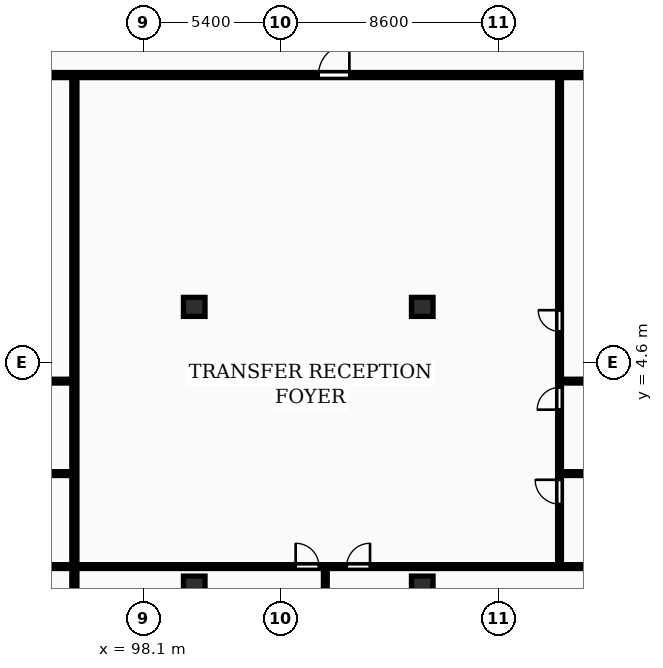
"""IFC4 building model, lengths in metres.
Left out: names, types, materials, properties, quantities, classifications, styles, units other than length and angle.
Written with IfcOpenShell. Run it as: python <this file> out.ifc"""

import sys

from ifc_helpers import new_model, si_unit, direction, frame, frame_2d, origin, origin_2d, place, context, subcontext, project, spatial, rectangle, extrude, element, fill, save


model = new_model("IFC4")
c1 = context("Model", 3, precision=1e-05, world=origin(), true_north=direction((0.0, 1.0)))
c2 = subcontext(c1, "Body", "Model", "MODEL_VIEW")
j1 = project(units=[si_unit("LENGTHUNIT", "METRE"), si_unit("PLANEANGLEUNIT", "RADIAN")], contexts=[c1])
p1 = place(None, origin())
s1 = spatial("IfcSite", under=j1, at=p1, CompositionType="ELEMENT")
p2 = place(p1, origin())
s2 = spatial("IfcBuilding", under=s1, at=p2, CompositionType="ELEMENT")
p3 = place(p2, frame((0.0, 0.0, 93.8)))
s3 = spatial("IfcBuildingStorey", under=s2, at=p3, CompositionType="ELEMENT", Elevation=93.8)
for number, where, z_axis, x_axis in (
    (1, (100.1, -4.2, 0.0), (0.0, 0.0, 1.0), (1.0, 0.0, 0.0)),
    (2, (100.1, 6.8, 0.0), (0.0, 0.0, 1.0), (1.0, 0.0, 0.0)),
    (3, (109.1, -4.2, 0.0), (0.0, 0.0, 1.0), (1.0, 0.0, 0.0)),
    (4, (109.1, 6.8, 0.0), (0.0, 0.0, 1.0), (1.0, 0.0, 0.0)),
):
    element("IfcColumn", number, at=place(p3, frame(where, z_axis=z_axis, x_axis=x_axis)), inside=s3, PredefinedType="COLUMN", context=c2, shape_type="SweptSolid", body=[
        extrude(rectangle(XDim=0.85, YDim=0.75, at=origin_2d()), origin(), (0.0, 0.0, 1.0), 3.25),
    ])
p4 = place(p3, frame((95.369, -8.7, 0.0), z_axis=(0.0, 0.0, 1.0), x_axis=(0.0, 1.0, 0.0)))
e5 = element("IfcWall", 5, at=p4, inside=s3, PredefinedType="PARTITIONING", context=c2, shape_type="SweptSolid", body=[
    extrude(rectangle(XDim=24.57, YDim=0.2, at=frame_2d((12.285, 0.0))), origin(), (0.0, 0.0, 1.0), 2.97),
])
for number, where, z_axis, x_axis in (
    (6, (91.929, 0.22, 0.0), (0.0, 0.0, 1.0), (1.0, 0.0, 0.0)),
    (7, (91.929, 3.87, 0.0), (0.0, 0.0, 1.0), (1.0, 0.0, 0.0)),
):
    element("IfcWall", number, at=place(p3, frame(where, z_axis=z_axis, x_axis=x_axis)), inside=s3, PredefinedType="PARTITIONING", context=c2, shape_type="SweptSolid", body=[
        extrude(rectangle(XDim=3.36, YDim=0.15, at=frame_2d((1.68, 0.0))), origin(), (0.0, 0.0, 1.0), 2.97),
    ])
p5 = place(p3, frame((72.78, -3.45, 0.0), z_axis=(0.0, 0.0, 1.0), x_axis=(1.0, 0.0, 0.0)))
e8 = element("IfcWall", 8, at=p5, inside=s3, PredefinedType="PARTITIONING", context=c2, shape_type="SweptSolid", body=[
    extrude(rectangle(XDim=22.509, YDim=0.15, at=frame_2d((11.254, 0.0))), origin(), (0.0, 0.0, 1.0), 2.97),
])
p6 = place(p5, frame((6.645, 0.0, 0.0)))
e9 = element("IfcOpeningElement", 9, at=p6, cuts=e8, PredefinedType="OPENING", context=c2, shape_type="SweptSolid", body=[
    extrude(rectangle(XDim=0.92, YDim=2.08, at=frame_2d((0.46, 1.04))), frame((0.0, 0.085, 0.0), z_axis=(0.0, -1.0, 0.0), x_axis=(1.0, 0.0, 0.0)), (0.0, 0.0, 1.0), 0.17),
])
p7 = place(p5, frame((11.024, 0.0, 0.0)))
e10 = element("IfcOpeningElement", 10, at=p7, cuts=e8, PredefinedType="OPENING", context=c2, shape_type="SweptSolid", body=[
    extrude(rectangle(XDim=0.92, YDim=2.08, at=frame_2d((0.46, 1.04))), frame((0.0, 0.085, 0.0), z_axis=(0.0, -1.0, 0.0), x_axis=(1.0, 0.0, 0.0)), (0.0, 0.0, 1.0), 0.17),
])
for number, where, z_axis, x_axis in (
    (11, (114.579, 0.22, 0.0), (0.0, 0.0, 1.0), (1.0, 0.0, 0.0)),
    (12, (114.579, 3.87, 0.0), (0.0, 0.0, 1.0), (1.0, 0.0, 0.0)),
):
    element("IfcWall", number, at=place(p3, frame(where, z_axis=z_axis, x_axis=x_axis)), inside=s3, PredefinedType="PARTITIONING", context=c2, shape_type="SweptSolid", body=[
        extrude(rectangle(XDim=3.13, YDim=0.15, at=frame_2d((1.565, 0.0))), origin(), (0.0, 0.0, 1.0), 2.97),
    ])
p8 = place(p3, frame((114.519, -3.39, 0.0), z_axis=(0.0, 0.0, 1.0), x_axis=(0.0, 1.0, 0.0)))
e13 = element("IfcWall", 13, at=p8, inside=s3, PredefinedType="PARTITIONING", context=c2, shape_type="SweptSolid", body=[
    extrude(rectangle(XDim=19.28, YDim=0.15, at=frame_2d((9.64, 0.0))), origin(), (0.0, 0.0, 1.0), 2.97),
])
p9 = place(p8, frame((2.406, 0.0, 0.0)))
e14 = element("IfcOpeningElement", 14, at=p9, cuts=e13, PredefinedType="OPENING", context=c2, shape_type="SweptSolid", body=[
    extrude(rectangle(XDim=0.96, YDim=2.1, at=frame_2d((0.48, 1.05))), frame((0.0, 0.085, 0.0), z_axis=(0.0, -1.0, 0.0), x_axis=(1.0, 0.0, 0.0)), (0.0, 0.0, 1.0), 0.17),
])
p10 = place(p8, frame((6.133, 0.0, 0.0)))
e15 = element("IfcOpeningElement", 15, at=p10, cuts=e13, PredefinedType="OPENING", context=c2, shape_type="SweptSolid", body=[
    extrude(rectangle(XDim=0.88, YDim=2.06, at=frame_2d((0.44, 1.03))), frame((0.0, 0.085, 0.0), z_axis=(0.0, -1.0, 0.0), x_axis=(1.0, 0.0, 0.0)), (0.0, 0.0, 1.0), 0.17),
])
p11 = place(p8, frame((9.22, 0.0, 0.0)))
e16 = element("IfcOpeningElement", 16, at=p11, cuts=e13, PredefinedType="OPENING", context=c2, shape_type="SweptSolid", body=[
    extrude(rectangle(XDim=0.84, YDim=2.04, at=frame_2d((0.42, 1.02))), frame((0.0, 0.085, 0.0), z_axis=(0.0, -1.0, 0.0), x_axis=(1.0, 0.0, 0.0)), (0.0, 0.0, 1.0), 0.17),
])
p12 = place(p3, frame((105.274, -8.7, 0.0), z_axis=(0.0, 0.0, 1.0), x_axis=(0.0, 1.0, 0.0)))
e17 = element("IfcWall", 17, at=p12, inside=s3, PredefinedType="PARTITIONING", context=c2, shape_type="SweptSolid", body=[
    extrude(rectangle(XDim=5.17, YDim=0.15, at=frame_2d((2.585, 0.0))), origin(), (0.0, 0.0, 1.0), 2.97),
])
p13 = place(p3, frame((95.449, -3.45, 0.0), z_axis=(0.0, 0.0, 1.0), x_axis=(1.0, 0.0, 0.0)))
e18 = element("IfcWall", 18, at=p13, inside=s3, PredefinedType="PARTITIONING", context=c2, shape_type="SweptSolid", body=[
    extrude(rectangle(XDim=22.26, YDim=0.15, at=frame_2d((11.13, 0.0))), origin(), (0.0, 0.0, 1.0), 2.97),
])
p14 = place(p13, frame((8.655, 0.0, 0.0)))
e19 = element("IfcOpeningElement", 19, at=p14, cuts=e18, PredefinedType="OPENING", context=c2, shape_type="SweptSolid", body=[
    extrude(rectangle(XDim=0.92, YDim=2.08, at=frame_2d((0.46, 1.04))), frame((0.0, 0.085, 0.0), z_axis=(0.0, -1.0, 0.0), x_axis=(1.0, 0.0, 0.0)), (0.0, 0.0, 1.0), 0.17),
])
p15 = place(p13, frame((10.67, 0.0, 0.0)))
e20 = element("IfcOpeningElement", 20, at=p15, cuts=e18, PredefinedType="OPENING", context=c2, shape_type="SweptSolid", body=[
    extrude(rectangle(XDim=0.92, YDim=2.08, at=frame_2d((0.46, 1.04))), frame((0.0, 0.085, 0.0), z_axis=(0.0, -1.0, 0.0), x_axis=(1.0, 0.0, 0.0)), (0.0, 0.0, 1.0), 0.17),
])
p16 = place(p3, frame((72.7, 15.95, 0.0), z_axis=(0.0, 0.0, 1.0), x_axis=(1.0, 0.0, 0.0)))
e21 = element("IfcWall", 21, at=p16, inside=s3, PredefinedType="PARTITIONING", context=c2, shape_type="SweptSolid", body=[
    extrude(rectangle(XDim=58.0, YDim=0.2, at=frame_2d((29.0, 0.0))), origin(), (0.0, 0.0, 1.0), 2.97),
])
p17 = place(p16, frame((11.114, 0.0, 0.0)))
e22 = element("IfcOpeningElement", 22, at=p17, cuts=e21, PredefinedType="OPENING", context=c2, shape_type="SweptSolid", body=[
    extrude(rectangle(XDim=1.22, YDim=2.18, at=frame_2d((0.61, 1.09))), frame((0.0, 0.11, 0.0), z_axis=(0.0, -1.0, 0.0), x_axis=(1.0, 0.0, 0.0)), (0.0, 0.0, 1.0), 0.22),
])
p18 = place(p16, frame((32.304, 0.0, 0.0)))
e23 = element("IfcOpeningElement", 23, at=p18, cuts=e21, PredefinedType="OPENING", context=c2, shape_type="SweptSolid", body=[
    extrude(rectangle(XDim=1.22, YDim=2.18, at=frame_2d((0.61, 1.09))), frame((0.0, 0.11, 0.0), z_axis=(0.0, -1.0, 0.0), x_axis=(1.0, 0.0, 0.0)), (0.0, 0.0, 1.0), 0.22),
])
p19 = place(p16, frame((47.134, 0.0, 0.0)))
e24 = element("IfcOpeningElement", 24, at=p19, cuts=e21, PredefinedType="OPENING", context=c2, shape_type="SweptSolid", body=[
    extrude(rectangle(XDim=0.95, YDim=2.15, at=frame_2d((0.475, 1.075))), frame((0.0, 0.11, 0.0), z_axis=(0.0, -1.0, 0.0), x_axis=(1.0, 0.0, 0.0)), (0.0, 0.0, 1.0), 0.22),
])
p20 = place(p9, origin())
e25 = element("IfcDoor", 25, at=p20, inside=s3, OperationType="SINGLE_SWING_RIGHT", PredefinedType="DOOR", context=c2, shape_type="SweptSolid", body=[
    extrude(rectangle(XDim=0.96, YDim=2.1, at=frame_2d((0.48, 1.05))), frame((0.0, 0.025, 0.0), z_axis=(0.0, -1.0, 0.0), x_axis=(1.0, 0.0, 0.0)), (0.0, 0.0, 1.0), 0.05),
])
fill(e14, e25)
p21 = place(p10, origin())
e26 = element("IfcDoor", 26, at=p21, inside=s3, OperationType="SINGLE_SWING_LEFT", PredefinedType="DOOR", context=c2, shape_type="SweptSolid", body=[
    extrude(rectangle(XDim=0.88, YDim=2.06, at=frame_2d((0.44, 1.03))), frame((0.0, 0.025, 0.0), z_axis=(0.0, -1.0, 0.0), x_axis=(1.0, 0.0, 0.0)), (0.0, 0.0, 1.0), 0.05),
])
fill(e15, e26)
p22 = place(p11, origin())
e27 = element("IfcDoor", 27, at=p22, inside=s3, OperationType="SINGLE_SWING_RIGHT", PredefinedType="DOOR", context=c2, shape_type="SweptSolid", body=[
    extrude(rectangle(XDim=0.84, YDim=2.04, at=frame_2d((0.42, 1.02))), frame((0.0, 0.025, 0.0), z_axis=(0.0, -1.0, 0.0), x_axis=(1.0, 0.0, 0.0)), (0.0, 0.0, 1.0), 0.05),
])
fill(e16, e27)
p23 = place(p14, origin())
e28 = element("IfcDoor", 28, at=p23, inside=s3, OperationType="SINGLE_SWING_LEFT", PredefinedType="DOOR", context=c2, shape_type="SweptSolid", body=[
    extrude(rectangle(XDim=0.92, YDim=2.08, at=frame_2d((0.46, 1.04))), frame((0.0, 0.025, 0.0), z_axis=(0.0, -1.0, 0.0), x_axis=(1.0, 0.0, 0.0)), (0.0, 0.0, 1.0), 0.05),
])
fill(e19, e28)
p24 = place(p15, origin())
e29 = element("IfcDoor", 29, at=p24, inside=s3, OperationType="SINGLE_SWING_RIGHT", PredefinedType="DOOR", context=c2, shape_type="SweptSolid", body=[
    extrude(rectangle(XDim=0.92, YDim=2.08, at=frame_2d((0.46, 1.04))), frame((0.0, 0.025, 0.0), z_axis=(0.0, -1.0, 0.0), x_axis=(1.0, 0.0, 0.0)), (0.0, 0.0, 1.0), 0.05),
])
fill(e20, e29)
p25 = place(p18, origin())
e30 = element("IfcDoor", 30, at=p25, inside=s3, OperationType="SINGLE_SWING_RIGHT", PredefinedType="DOOR", context=c2, shape_type="SweptSolid", body=[
    extrude(rectangle(XDim=1.22, YDim=2.18, at=frame_2d((0.61, 1.09))), frame((0.0, 0.025, 0.0), z_axis=(0.0, -1.0, 0.0), x_axis=(1.0, 0.0, 0.0)), (0.0, 0.0, 1.0), 0.05),
])
fill(e23, e30)
save(model, sys.argv[1])
